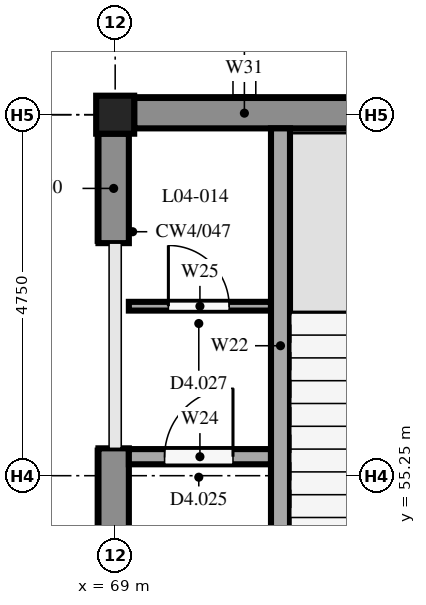
"""IFC4 building model, lengths in metres.
Left out: names, types, materials, properties, quantities, classifications, styles, units other than length and angle.
Written with IfcOpenShell. Run it as: python <this file> out.ifc"""

import sys

from ifc_helpers import new_model, si_unit, direction, frame, frame_2d, origin, origin_2d, place, context, subcontext, project, spatial, rectangle, extrude, element, fill, save


model = new_model("IFC4")
c1 = context("Model", 3, precision=1e-05, world=origin(), true_north=direction((0.0, 1.0)))
c2 = subcontext(c1, "Body", "Model", "MODEL_VIEW")
j1 = project(units=[si_unit("LENGTHUNIT", "METRE"), si_unit("PLANEANGLEUNIT", "RADIAN")], contexts=[c1])
p1 = place(None, origin())
s1 = spatial("IfcSite", under=j1, at=p1, CompositionType="ELEMENT")
p2 = place(p1, origin())
s2 = spatial("IfcBuilding", under=s1, at=p2, CompositionType="ELEMENT")
p3 = place(p2, frame((0.0, 0.0, 15.3)))
s3 = spatial("IfcBuildingStorey", under=s2, at=p3, CompositionType="ELEMENT", Elevation=15.3)
p4 = place(p3, frame((69.0, 60.0, 0.0), z_axis=(0.0, 0.0, 1.0), x_axis=(1.0, 0.0, 0.0)))
e1 = element("IfcColumn", 1, at=p4, inside=s3, PredefinedType="COLUMN", context=c2, shape_type="SweptSolid", body=[
    extrude(rectangle(XDim=0.5, YDim=0.5, at=origin_2d()), origin(), (0.0, 0.0, 1.0), 3.3),
])
p5 = place(p3, frame((68.98, 51.25, 0.0), z_axis=(0.0, 0.0, 1.0), x_axis=(0.0, 1.0, 0.0)))
e2 = element("IfcWall", 2, at=p5, inside=s3, PredefinedType="STANDARD", context=c2, shape_type="SweptSolid", body=[
    extrude(rectangle(XDim=4.36, YDim=0.4, at=frame_2d((2.18, 0.0))), origin(), (0.0, 0.0, 1.0), 2.75),
])
p6 = place(p3, frame((68.98, 58.31, 0.0), z_axis=(0.0, 0.0, 1.0), x_axis=(0.0, 1.0, 0.0)))
e3 = element("IfcWall", 3, at=p6, inside=s3, PredefinedType="STANDARD", context=c2, shape_type="SweptSolid", body=[
    extrude(rectangle(XDim=1.44, YDim=0.4, at=frame_2d((0.72, 0.0))), origin(), (0.0, 0.0, 1.0), 2.75),
])
p7 = place(p3, frame((69.25, 60.02, 0.0), z_axis=(0.0, 0.0, 1.0), x_axis=(1.0, 0.0, 0.0)))
e4 = element("IfcWall", 4, at=p7, inside=s3, PredefinedType="STANDARD", context=c2, shape_type="SweptSolid", body=[
    extrude(rectangle(XDim=2.9, YDim=0.4, at=frame_2d((1.45, 0.0))), origin(), (0.0, 0.0, 1.0), 2.8),
])
p8 = place(p3, frame((71.175, 54.1, 0.0), z_axis=(0.0, 0.0, 1.0), x_axis=(0.0, 1.0, 0.0)))
e5 = element("IfcWall", 5, at=p8, inside=s3, PredefinedType="SOLIDWALL", context=c2, shape_type="SweptSolid", body=[
    extrude(rectangle(XDim=5.72, YDim=0.25, at=frame_2d((2.86, 0.0))), origin(), (0.0, 0.0, 1.0), 3.3),
])
p9 = place(p3, frame((69.18, 55.5, 0.0), z_axis=(0.0, 0.0, 1.0), x_axis=(1.0, 0.0, 0.0)))
e6 = element("IfcWall", 6, at=p9, inside=s3, PredefinedType="SOLIDWALL", context=c2, shape_type="SweptSolid", body=[
    extrude(rectangle(XDim=1.87, YDim=0.2, at=frame_2d((0.935, 0.0))), origin(), (0.0, 0.0, 1.0), 3.3),
])
p10 = place(p9, frame((0.47, 0.0, 0.0)))
e7 = element("IfcOpeningElement", 7, at=p10, cuts=e6, PredefinedType="OPENING", context=c2, shape_type="SweptSolid", body=[
    extrude(rectangle(XDim=0.9, YDim=2.1, at=frame_2d((0.45, 1.05))), frame((0.0, 0.11, 0.0), z_axis=(0.0, -1.0, 0.0), x_axis=(1.0, 0.0, 0.0)), (0.0, 0.0, 1.0), 0.22),
])
p11 = place(p3, frame((69.18, 57.48, 0.0), z_axis=(0.0, 0.0, 1.0), x_axis=(1.0, 0.0, 0.0)))
e8 = element("IfcWall", 8, at=p11, inside=s3, PredefinedType="PARTITIONING", context=c2, shape_type="SweptSolid", body=[
    extrude(rectangle(XDim=1.87, YDim=0.115, at=frame_2d((0.935, 0.0))), origin(), (0.0, 0.0, 1.0), 3.3),
])
p12 = place(p11, frame((0.52, 0.0, 0.0)))
e9 = element("IfcOpeningElement", 9, at=p12, cuts=e8, PredefinedType="OPENING", context=c2, shape_type="SweptSolid", body=[
    extrude(rectangle(XDim=0.8, YDim=2.1, at=frame_2d((0.4, 1.05))), frame((0.0, 0.067, 0.0), z_axis=(0.0, -1.0, 0.0), x_axis=(1.0, 0.0, 0.0)), (0.0, 0.0, 1.0), 0.135),
])
p13 = place(p10, origin())
e10 = element("IfcDoor", 10, at=p13, inside=s3, OperationType="SINGLE_SWING_RIGHT", PredefinedType="DOOR", context=c2, shape_type="SweptSolid", body=[
    extrude(rectangle(XDim=0.9, YDim=2.1, at=frame_2d((0.45, 1.05))), frame((0.0, 0.025, 0.0), z_axis=(0.0, -1.0, 0.0), x_axis=(1.0, 0.0, 0.0)), (0.0, 0.0, 1.0), 0.05),
])
fill(e7, e10)
p14 = place(p12, origin())
e11 = element("IfcDoor", 11, at=p14, inside=s3, OperationType="SINGLE_SWING_LEFT", PredefinedType="DOOR", context=c2, shape_type="SweptSolid", body=[
    extrude(rectangle(XDim=0.8, YDim=2.1, at=frame_2d((0.4, 1.05))), frame((0.0, 0.025, 0.0), z_axis=(0.0, -1.0, 0.0), x_axis=(1.0, 0.0, 0.0)), (0.0, 0.0, 1.0), 0.05),
])
fill(e9, e11)
save(model, sys.argv[1])
